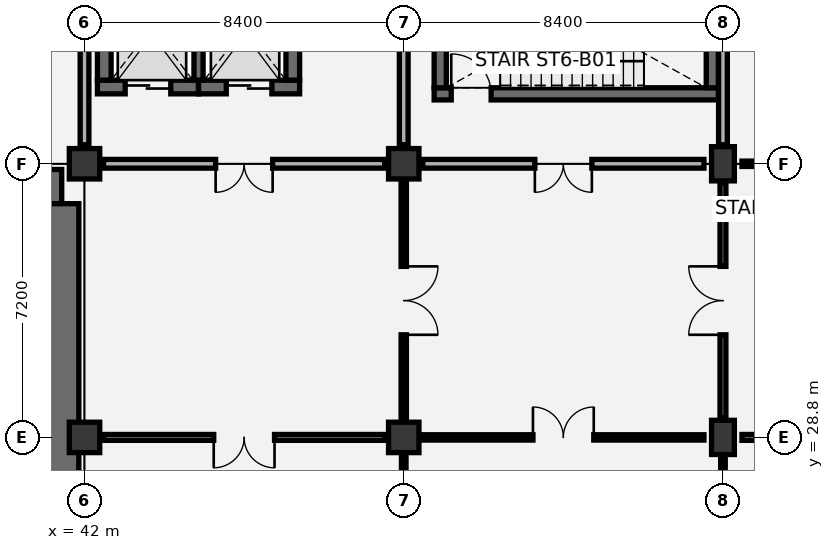
"""IFC4 building model, lengths in metres.
Left out: names, types, materials, properties, quantities, classifications, styles, units other than length and angle.
Written with IfcOpenShell. Run it as: python <this file> out.ifc"""

import sys

from ifc_helpers import new_model, si_unit, direction, frame, frame_2d, origin, origin_2d, place, context, subcontext, project, spatial, rectangle, extrude, element, fill, save


model = new_model("IFC4")
c1 = context("Model", 3, precision=1e-05, world=origin(), true_north=direction((0.0, 1.0)))
c2 = subcontext(c1, "Body", "Model", "MODEL_VIEW")
j1 = project(units=[si_unit("LENGTHUNIT", "METRE"), si_unit("PLANEANGLEUNIT", "RADIAN")], contexts=[c1])
p1 = place(None, origin())
s1 = spatial("IfcSite", under=j1, at=p1, CompositionType="ELEMENT")
p2 = place(p1, origin())
s2 = spatial("IfcBuilding", under=s1, at=p2, CompositionType="ELEMENT")
p3 = place(p2, frame((0.0, 0.0, -4.8)))
s3 = spatial("IfcBuildingStorey", under=s2, at=p3, CompositionType="ELEMENT", Elevation=-4.8)
for number, where, z_axis, x_axis in (
    (1, (42.0, 28.8, 0.0), (0.0, 0.0, 1.0), (1.0, 0.0, 0.0)),
    (2, (42.0, 36.0, 0.0), (0.0, 0.0, 1.0), (1.0, 0.0, 0.0)),
    (3, (50.4, 28.8, 0.0), (0.0, 0.0, 1.0), (1.0, 0.0, 0.0)),
    (4, (50.4, 36.0, 0.0), (0.0, 0.0, 1.0), (1.0, 0.0, 0.0)),
):
    element("IfcColumn", number, at=place(p3, frame(where, z_axis=z_axis, x_axis=x_axis)), inside=s3, PredefinedType="COLUMN", context=c2, shape_type="SweptSolid", body=[
        extrude(rectangle(XDim=0.8, YDim=0.8, at=origin_2d()), origin(), (0.0, 0.0, 1.0), 4.8),
    ])
for number, where, z_axis, x_axis in (
    (5, (58.8, 28.8, 0.0), (0.0, 0.0, 1.0), (1.0, 0.0, 0.0)),
    (6, (58.8, 36.0, 0.0), (0.0, 0.0, 1.0), (1.0, 0.0, 0.0)),
):
    element("IfcColumn", number, at=place(p3, frame(where, z_axis=z_axis, x_axis=x_axis)), inside=s3, PredefinedType="COLUMN", context=c2, shape_type="SweptSolid", body=[
        extrude(rectangle(XDim=0.6, YDim=0.9, at=origin_2d()), origin(), (0.0, 0.0, 1.0), 4.8),
    ])
p4 = place(p3, frame((17.4, 35.4, 0.0), z_axis=(0.0, 0.0, 1.0), x_axis=(1.0, 0.0, 0.0)))
e7 = element("IfcWall", 7, at=p4, inside=s3, PredefinedType="SOLIDWALL", context=c2, shape_type="SweptSolid", body=[
    extrude(rectangle(XDim=24.0, YDim=0.9, at=frame_2d((12.0, 0.0))), origin(), (0.0, 0.0, 1.0), 4.8),
])
p5 = place(p4, frame((2.6, 0.0, 0.85)))
e8 = element("IfcOpeningElement", 8, at=p5, cuts=e7, PredefinedType="OPENING", context=c2, shape_type="SweptSolid", body=[
    extrude(rectangle(XDim=5.2, YDim=2.9, at=frame_2d((2.6, 1.45))), frame((0.0, 0.46, 0.0), z_axis=(0.0, -1.0, 0.0), x_axis=(1.0, 0.0, 0.0)), (0.0, 0.0, 1.0), 0.92),
])
p6 = place(p4, frame((14.8, 0.0, 0.85)))
e9 = element("IfcOpeningElement", 9, at=p6, cuts=e7, PredefinedType="OPENING", context=c2, shape_type="SweptSolid", body=[
    extrude(rectangle(XDim=5.2, YDim=2.9, at=frame_2d((2.6, 1.45))), frame((0.0, 0.46, 0.0), z_axis=(0.0, -1.0, 0.0), x_axis=(1.0, 0.0, 0.0)), (0.0, 0.0, 1.0), 0.92),
])
p7 = place(p3, frame((41.4, 22.65, 0.0), z_axis=(0.0, 0.0, 1.0), x_axis=(0.0, 1.0, 0.0)))
e10 = element("IfcWall", 10, at=p7, inside=s3, PredefinedType="SOLIDWALL", context=c2, shape_type="SweptSolid", body=[
    extrude(rectangle(XDim=12.3, YDim=0.9, at=frame_2d((6.15, 0.0))), origin(), (0.0, 0.0, 1.0), 4.8),
])
p8 = place(p7, frame((3.25, 0.0, 0.0)))
e11 = element("IfcOpeningElement", 11, at=p8, cuts=e10, PredefinedType="OPENING", context=c2, shape_type="SweptSolid", body=[
    extrude(rectangle(XDim=1.8, YDim=2.2, at=frame_2d((0.9, 1.1))), frame((0.0, 0.46, 0.0), z_axis=(0.0, -1.0, 0.0), x_axis=(1.0, 0.0, 0.0)), (0.0, 0.0, 1.0), 0.92),
])
p9 = place(p3, frame((51.2, 37.84, 0.0), z_axis=(0.0, 0.0, 1.0), x_axis=(1.0, 0.0, 0.0)))
e12 = element("IfcWall", 12, at=p9, inside=s3, PredefinedType="SHEAR", context=c2, shape_type="SweptSolid", body=[
    extrude(rectangle(XDim=7.48, YDim=0.32, at=frame_2d((3.74, 0.0))), origin(), (0.0, 0.0, 1.0), 4.45),
])
p10 = place(p9, frame((0.45, 0.0, 0.0)))
e13 = element("IfcOpeningElement", 13, at=p10, cuts=e12, PredefinedType="OPENING", context=c2, shape_type="SweptSolid", body=[
    extrude(rectangle(XDim=1.05, YDim=2.15, at=frame_2d((0.525, 1.075))), frame((0.0, 0.17, 0.0), z_axis=(0.0, -1.0, 0.0), x_axis=(1.0, 0.0, 0.0)), (0.0, 0.0, 1.0), 0.34),
])
for number, where, z_axis, x_axis in (
    (14, (51.36, 38.0, 0.0), (0.0, 0.0, 1.0), (0.0, 1.0, 0.0)),
    (15, (58.52, 38.0, 0.0), (0.0, 0.0, 1.0), (0.0, 1.0, 0.0)),
):
    element("IfcWall", number, at=place(p3, frame(where, z_axis=z_axis, x_axis=x_axis)), inside=s3, PredefinedType="SHEAR", context=c2, shape_type="SweptSolid", body=[
        extrude(rectangle(XDim=3.8, YDim=0.32, at=frame_2d((1.9, 0.0))), origin(), (0.0, 0.0, 1.0), 4.45),
    ])
p11 = place(p3, frame((42.34, 38.02, 0.0), z_axis=(0.0, 0.0, 1.0), x_axis=(1.0, 0.0, 0.0)))
e16 = element("IfcWall", 16, at=p11, inside=s3, PredefinedType="SHEAR", context=c2, shape_type="SweptSolid", body=[
    extrude(rectangle(XDim=2.66, YDim=0.36, at=frame_2d((1.33, 0.0))), origin(), (0.0, 0.0, 1.0), 4.45),
])
p12 = place(p11, frame((0.73, 0.0, 0.0)))
e17 = element("IfcOpeningElement", 17, at=p12, cuts=e16, PredefinedType="OPENING", context=c2, shape_type="SweptSolid", body=[
    extrude(rectangle(XDim=1.2, YDim=2.15, at=frame_2d((0.6, 1.075))), frame((0.0, 0.19, 0.0), z_axis=(0.0, -1.0, 0.0), x_axis=(1.0, 0.0, 0.0)), (0.0, 0.0, 1.0), 0.38),
])
p13 = place(p3, frame((45.0, 38.02, 0.0), z_axis=(0.0, 0.0, 1.0), x_axis=(1.0, 0.0, 0.0)))
e18 = element("IfcWall", 18, at=p13, inside=s3, PredefinedType="SHEAR", context=c2, shape_type="SweptSolid", body=[
    extrude(rectangle(XDim=2.66, YDim=0.36, at=frame_2d((1.33, 0.0))), origin(), (0.0, 0.0, 1.0), 4.45),
])
p14 = place(p13, frame((0.73, 0.0, 0.0)))
e19 = element("IfcOpeningElement", 19, at=p14, cuts=e18, PredefinedType="OPENING", context=c2, shape_type="SweptSolid", body=[
    extrude(rectangle(XDim=1.2, YDim=2.15, at=frame_2d((0.6, 1.075))), frame((0.0, 0.19, 0.0), z_axis=(0.0, -1.0, 0.0), x_axis=(1.0, 0.0, 0.0)), (0.0, 0.0, 1.0), 0.38),
])
for number, where, z_axis, x_axis in (
    (20, (42.52, 38.2, 0.0), (0.0, 0.0, 1.0), (0.0, 1.0, 0.0)),
    (21, (47.48, 38.2, 0.0), (0.0, 0.0, 1.0), (0.0, 1.0, 0.0)),
):
    element("IfcWall", number, at=place(p3, frame(where, z_axis=z_axis, x_axis=x_axis)), inside=s3, PredefinedType="SHEAR", context=c2, shape_type="SweptSolid", body=[
        extrude(rectangle(XDim=2.8, YDim=0.36, at=frame_2d((1.4, 0.0))), origin(), (0.0, 0.0, 1.0), 4.45),
    ])
p15 = place(p3, frame((45.0, 38.2, 0.0), z_axis=(0.0, 0.0, 1.0), x_axis=(0.0, 1.0, 0.0)))
e22 = element("IfcWall", 22, at=p15, inside=s3, PredefinedType="SHEAR", context=c2, shape_type="SweptSolid", body=[
    extrude(rectangle(XDim=2.8, YDim=0.24, at=frame_2d((1.4, 0.0))), origin(), (0.0, 0.0, 1.0), 4.45),
])
p16 = place(p3, frame((42.0, 36.5, 0.0), z_axis=(0.0, 0.0, 1.0), x_axis=(0.0, 1.0, 0.0)))
e23 = element("IfcWall", 23, at=p16, inside=s3, PredefinedType="PARTITIONING", context=c2, shape_type="SweptSolid", body=[
    extrude(rectangle(XDim=6.2, YDim=0.23, at=frame_2d((3.1, 0.0))), origin(), (0.0, 0.0, 1.0), 3.645),
])
p17 = place(p3, frame((50.4, 22.1, 0.0), z_axis=(0.0, 0.0, 1.0), x_axis=(0.0, 1.0, 0.0)))
e24 = element("IfcWall", 24, at=p17, inside=s3, PredefinedType="PARTITIONING", context=c2, shape_type="SweptSolid", body=[
    extrude(rectangle(XDim=6.2, YDim=0.12, at=frame_2d((3.1, 0.0))), origin(), (0.0, 0.0, 1.0), 3.645),
])
p18 = place(p3, frame((42.5, 28.8, 0.0), z_axis=(0.0, 0.0, 1.0), x_axis=(1.0, 0.0, 0.0)))
e25 = element("IfcWall", 25, at=p18, inside=s3, PredefinedType="PARTITIONING", context=c2, shape_type="SweptSolid", body=[
    extrude(rectangle(XDim=7.4, YDim=0.155, at=frame_2d((3.7, 0.0))), origin(), (0.0, 0.0, 1.0), 3.545),
])
p19 = place(p18, frame((2.9, 0.0, 0.0)))
e26 = element("IfcOpeningElement", 26, at=p19, cuts=e25, PredefinedType="OPENING", context=c2, shape_type="SweptSolid", body=[
    extrude(rectangle(XDim=1.6, YDim=2.2, at=frame_2d((0.8, 1.1))), frame((0.0, 0.087, 0.0), z_axis=(0.0, -1.0, 0.0), x_axis=(1.0, 0.0, 0.0)), (0.0, 0.0, 1.0), 0.175),
])
p20 = place(p3, frame((50.4, 29.3, 0.0), z_axis=(0.0, 0.0, 1.0), x_axis=(0.0, 1.0, 0.0)))
e27 = element("IfcWall", 27, at=p20, inside=s3, PredefinedType="PARTITIONING", context=c2, shape_type="SweptSolid", body=[
    extrude(rectangle(XDim=6.2, YDim=0.14, at=frame_2d((3.1, 0.0))), origin(), (0.0, 0.0, 1.0), 3.645),
])
p21 = place(p20, frame((2.2, 0.0, 0.0)))
e28 = element("IfcOpeningElement", 28, at=p21, cuts=e27, PredefinedType="OPENING", context=c2, shape_type="SweptSolid", body=[
    extrude(rectangle(XDim=1.8, YDim=2.25, at=frame_2d((0.9, 1.125))), frame((0.0, 0.08, 0.0), z_axis=(0.0, -1.0, 0.0), x_axis=(1.0, 0.0, 0.0)), (0.0, 0.0, 1.0), 0.16),
])
p22 = place(p3, frame((42.5, 36.0, 0.0), z_axis=(0.0, 0.0, 1.0), x_axis=(1.0, 0.0, 0.0)))
e29 = element("IfcWall", 29, at=p22, inside=s3, PredefinedType="PARTITIONING", context=c2, shape_type="SweptSolid", body=[
    extrude(rectangle(XDim=7.4, YDim=0.23, at=frame_2d((3.7, 0.0))), origin(), (0.0, 0.0, 1.0), 3.545),
])
p23 = place(p22, frame((2.95, 0.0, 0.0)))
e30 = element("IfcOpeningElement", 30, at=p23, cuts=e29, PredefinedType="OPENING", context=c2, shape_type="SweptSolid", body=[
    extrude(rectangle(XDim=1.5, YDim=2.15, at=frame_2d((0.75, 1.075))), frame((0.0, 0.125, 0.0), z_axis=(0.0, -1.0, 0.0), x_axis=(1.0, 0.0, 0.0)), (0.0, 0.0, 1.0), 0.25),
])
p24 = place(p3, frame((50.4, 36.5, 0.0), z_axis=(0.0, 0.0, 1.0), x_axis=(0.0, 1.0, 0.0)))
e31 = element("IfcWall", 31, at=p24, inside=s3, PredefinedType="PARTITIONING", context=c2, shape_type="SweptSolid", body=[
    extrude(rectangle(XDim=6.2, YDim=0.23, at=frame_2d((3.1, 0.0))), origin(), (0.0, 0.0, 1.0), 3.645),
])
p25 = place(p3, frame((58.8, 22.1, 0.0), z_axis=(0.0, 0.0, 1.0), x_axis=(0.0, 1.0, 0.0)))
e32 = element("IfcWall", 32, at=p25, inside=s3, PredefinedType="PARTITIONING", context=c2, shape_type="SweptSolid", body=[
    extrude(rectangle(XDim=6.2, YDim=0.12, at=frame_2d((3.1, 0.0))), origin(), (0.0, 0.0, 1.0), 3.645),
])
p26 = place(p3, frame((50.9, 28.8, 0.0), z_axis=(0.0, 0.0, 1.0), x_axis=(1.0, 0.0, 0.0)))
e33 = element("IfcWall", 33, at=p26, inside=s3, PredefinedType="PARTITIONING", context=c2, shape_type="SweptSolid", body=[
    extrude(rectangle(XDim=7.4, YDim=0.14, at=frame_2d((3.7, 0.0))), origin(), (0.0, 0.0, 1.0), 3.545),
])
p27 = place(p26, frame((2.9, 0.0, 0.0)))
e34 = element("IfcOpeningElement", 34, at=p27, cuts=e33, PredefinedType="OPENING", context=c2, shape_type="SweptSolid", body=[
    extrude(rectangle(XDim=1.6, YDim=2.2, at=frame_2d((0.8, 1.1))), frame((0.0, 0.08, 0.0), z_axis=(0.0, -1.0, 0.0), x_axis=(1.0, 0.0, 0.0)), (0.0, 0.0, 1.0), 0.16),
])
p28 = place(p3, frame((58.8, 29.3, 0.0), z_axis=(0.0, 0.0, 1.0), x_axis=(0.0, 1.0, 0.0)))
e35 = element("IfcWall", 35, at=p28, inside=s3, PredefinedType="PARTITIONING", context=c2, shape_type="SweptSolid", body=[
    extrude(rectangle(XDim=6.2, YDim=0.155, at=frame_2d((3.1, 0.0))), origin(), (0.0, 0.0, 1.0), 3.645),
])
p29 = place(p28, frame((2.2, 0.0, 0.0)))
e36 = element("IfcOpeningElement", 36, at=p29, cuts=e35, PredefinedType="OPENING", context=c2, shape_type="SweptSolid", body=[
    extrude(rectangle(XDim=1.8, YDim=2.25, at=frame_2d((0.9, 1.125))), frame((0.0, 0.087, 0.0), z_axis=(0.0, -1.0, 0.0), x_axis=(1.0, 0.0, 0.0)), (0.0, 0.0, 1.0), 0.175),
])
p30 = place(p3, frame((50.9, 36.0, 0.0), z_axis=(0.0, 0.0, 1.0), x_axis=(1.0, 0.0, 0.0)))
e37 = element("IfcWall", 37, at=p30, inside=s3, PredefinedType="PARTITIONING", context=c2, shape_type="SweptSolid", body=[
    extrude(rectangle(XDim=7.4, YDim=0.23, at=frame_2d((3.7, 0.0))), origin(), (0.0, 0.0, 1.0), 3.545),
])
p31 = place(p30, frame((2.95, 0.0, 0.0)))
e38 = element("IfcOpeningElement", 38, at=p31, cuts=e37, PredefinedType="OPENING", context=c2, shape_type="SweptSolid", body=[
    extrude(rectangle(XDim=1.5, YDim=2.15, at=frame_2d((0.75, 1.075))), frame((0.0, 0.125, 0.0), z_axis=(0.0, -1.0, 0.0), x_axis=(1.0, 0.0, 0.0)), (0.0, 0.0, 1.0), 0.25),
])
p32 = place(p3, frame((58.8, 36.5, 0.0), z_axis=(0.0, 0.0, 1.0), x_axis=(0.0, 1.0, 0.0)))
e39 = element("IfcWall", 39, at=p32, inside=s3, PredefinedType="PARTITIONING", context=c2, shape_type="SweptSolid", body=[
    extrude(rectangle(XDim=6.2, YDim=0.23, at=frame_2d((3.1, 0.0))), origin(), (0.0, 0.0, 1.0), 3.645),
])
p33 = place(p3, frame((59.3, 28.8, 0.0), z_axis=(0.0, 0.0, 1.0), x_axis=(1.0, 0.0, 0.0)))
e40 = element("IfcWall", 40, at=p33, inside=s3, PredefinedType="PARTITIONING", context=c2, shape_type="SweptSolid", body=[
    extrude(rectangle(XDim=7.4, YDim=0.155, at=frame_2d((3.7, 0.0))), origin(), (0.0, 0.0, 1.0), 3.545),
])
p34 = place(p33, frame((2.9, 0.0, 0.0)))
e41 = element("IfcOpeningElement", 41, at=p34, cuts=e40, PredefinedType="OPENING", context=c2, shape_type="SweptSolid", body=[
    extrude(rectangle(XDim=1.6, YDim=2.2, at=frame_2d((0.8, 1.1))), frame((0.0, 0.087, 0.0), z_axis=(0.0, -1.0, 0.0), x_axis=(1.0, 0.0, 0.0)), (0.0, 0.0, 1.0), 0.175),
])
p35 = place(p3, frame((59.3, 36.0, 0.0), z_axis=(0.0, 0.0, 1.0), x_axis=(1.0, 0.0, 0.0)))
e42 = element("IfcWall", 42, at=p35, inside=s3, PredefinedType="PARTITIONING", context=c2, shape_type="SweptSolid", body=[
    extrude(rectangle(XDim=7.4, YDim=0.14, at=frame_2d((3.7, 0.0))), origin(), (0.0, 0.0, 1.0), 3.545),
])
p36 = place(p35, frame((2.8, 0.0, 0.0)))
e43 = element("IfcOpeningElement", 43, at=p36, cuts=e42, PredefinedType="OPENING", context=c2, shape_type="SweptSolid", body=[
    extrude(rectangle(XDim=1.8, YDim=2.25, at=frame_2d((0.9, 1.125))), frame((0.0, 0.08, 0.0), z_axis=(0.0, -1.0, 0.0), x_axis=(1.0, 0.0, 0.0)), (0.0, 0.0, 1.0), 0.16),
])
p37 = place(p10, origin())
e44 = element("IfcDoor", 44, at=p37, inside=s3, OperationType="SINGLE_SWING_LEFT", PredefinedType="DOOR", context=c2, shape_type="SweptSolid", body=[
    extrude(rectangle(XDim=1.05, YDim=2.15, at=frame_2d((0.525, 1.075))), frame((0.0, 0.025, 0.0), z_axis=(0.0, -1.0, 0.0), x_axis=(1.0, 0.0, 0.0)), (0.0, 0.0, 1.0), 0.05),
])
fill(e13, e44)
p38 = place(p12, origin())
e45 = element("IfcDoor", 45, at=p38, inside=s3, OperationType="DOUBLE_DOOR_SLIDING", PredefinedType="DOOR", context=c2, shape_type="SweptSolid", body=[
    extrude(rectangle(XDim=1.2, YDim=2.15, at=frame_2d((0.6, 1.075))), frame((0.0, 0.025, 0.0), z_axis=(0.0, -1.0, 0.0), x_axis=(1.0, 0.0, 0.0)), (0.0, 0.0, 1.0), 0.05),
])
fill(e17, e45)
p39 = place(p14, origin())
e46 = element("IfcDoor", 46, at=p39, inside=s3, OperationType="DOUBLE_DOOR_SLIDING", PredefinedType="DOOR", context=c2, shape_type="SweptSolid", body=[
    extrude(rectangle(XDim=1.2, YDim=2.15, at=frame_2d((0.6, 1.075))), frame((0.0, 0.025, 0.0), z_axis=(0.0, -1.0, 0.0), x_axis=(1.0, 0.0, 0.0)), (0.0, 0.0, 1.0), 0.05),
])
fill(e19, e46)
p40 = place(p19, frame((1.6, 0.0, 0.0), z_axis=(0.0, 0.0, 1.0), x_axis=(-1.0, 0.0, 0.0)))
e47 = element("IfcDoor", 47, at=p40, inside=s3, OperationType="DOUBLE_DOOR_SINGLE_SWING", PredefinedType="DOOR", context=c2, shape_type="SweptSolid", body=[
    extrude(rectangle(XDim=1.6, YDim=2.2, at=frame_2d((0.8, 1.1))), frame((0.0, 0.025, 0.0), z_axis=(0.0, -1.0, 0.0), x_axis=(1.0, 0.0, 0.0)), (0.0, 0.0, 1.0), 0.05),
])
fill(e26, e47)
p41 = place(p21, frame((1.8, 0.0, 0.0), z_axis=(0.0, 0.0, 1.0), x_axis=(-1.0, 0.0, 0.0)))
e48 = element("IfcDoor", 48, at=p41, inside=s3, OperationType="DOUBLE_DOOR_SINGLE_SWING", PredefinedType="DOOR", context=c2, shape_type="SweptSolid", body=[
    extrude(rectangle(XDim=1.8, YDim=2.25, at=frame_2d((0.9, 1.125))), frame((0.0, 0.025, 0.0), z_axis=(0.0, -1.0, 0.0), x_axis=(1.0, 0.0, 0.0)), (0.0, 0.0, 1.0), 0.05),
])
fill(e28, e48)
p42 = place(p23, frame((1.5, 0.0, 0.0), z_axis=(0.0, 0.0, 1.0), x_axis=(-1.0, 0.0, 0.0)))
e49 = element("IfcDoor", 49, at=p42, inside=s3, OperationType="DOUBLE_DOOR_SINGLE_SWING", PredefinedType="DOOR", context=c2, shape_type="SweptSolid", body=[
    extrude(rectangle(XDim=1.5, YDim=2.15, at=frame_2d((0.75, 1.075))), frame((0.0, 0.025, 0.0), z_axis=(0.0, -1.0, 0.0), x_axis=(1.0, 0.0, 0.0)), (0.0, 0.0, 1.0), 0.05),
])
fill(e30, e49)
p43 = place(p27, origin())
e50 = element("IfcDoor", 50, at=p43, inside=s3, OperationType="DOUBLE_DOOR_SINGLE_SWING", PredefinedType="DOOR", context=c2, shape_type="SweptSolid", body=[
    extrude(rectangle(XDim=1.6, YDim=2.2, at=frame_2d((0.8, 1.1))), frame((0.0, 0.025, 0.0), z_axis=(0.0, -1.0, 0.0), x_axis=(1.0, 0.0, 0.0)), (0.0, 0.0, 1.0), 0.05),
])
fill(e34, e50)
p44 = place(p29, origin())
e51 = element("IfcDoor", 51, at=p44, inside=s3, OperationType="DOUBLE_DOOR_SINGLE_SWING", PredefinedType="DOOR", context=c2, shape_type="SweptSolid", body=[
    extrude(rectangle(XDim=1.8, YDim=2.25, at=frame_2d((0.9, 1.125))), frame((0.0, 0.025, 0.0), z_axis=(0.0, -1.0, 0.0), x_axis=(1.0, 0.0, 0.0)), (0.0, 0.0, 1.0), 0.05),
])
fill(e36, e51)
p45 = place(p31, frame((1.5, 0.0, 0.0), z_axis=(0.0, 0.0, 1.0), x_axis=(-1.0, 0.0, 0.0)))
e52 = element("IfcDoor", 52, at=p45, inside=s3, OperationType="DOUBLE_DOOR_SINGLE_SWING", PredefinedType="DOOR", context=c2, shape_type="SweptSolid", body=[
    extrude(rectangle(XDim=1.5, YDim=2.15, at=frame_2d((0.75, 1.075))), frame((0.0, 0.025, 0.0), z_axis=(0.0, -1.0, 0.0), x_axis=(1.0, 0.0, 0.0)), (0.0, 0.0, 1.0), 0.05),
])
fill(e38, e52)
save(model, sys.argv[1])
